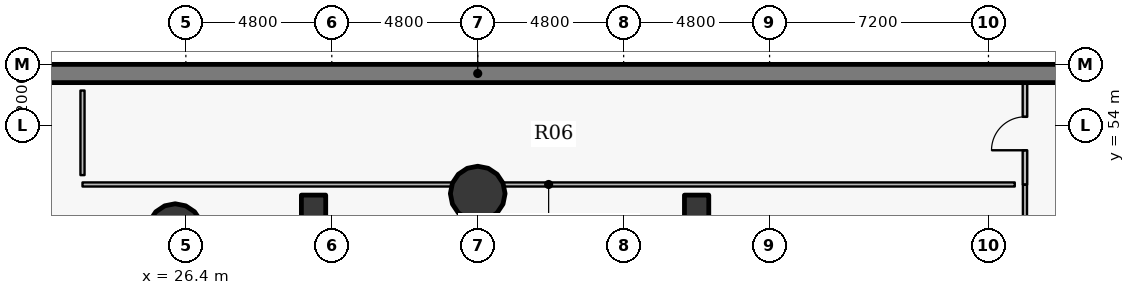
"""IFC4 building model, lengths in metres.
Left out: names, types, materials, properties, quantities, classifications, styles, units other than length and angle.
Written with IfcOpenShell. Run it as: python <this file> out.ifc"""

import sys

from ifc_helpers import new_model, si_unit, direction, frame, frame_2d, origin, origin_2d, place, context, subcontext, project, spatial, rectangle, hollow_circle, extrude, source, transform, mapped, element, fill, save


model = new_model("IFC4")
c1 = context("Model", 3, precision=1e-05, world=origin(), true_north=direction((0.0, 1.0)))
c2 = subcontext(c1, "Body", "Model", "MODEL_VIEW")
j1 = project(units=[si_unit("LENGTHUNIT", "METRE"), si_unit("PLANEANGLEUNIT", "RADIAN")], contexts=[c1])
p1 = place(None, origin())
s1 = spatial("IfcSite", under=j1, at=p1, CompositionType="ELEMENT")
p2 = place(p1, origin())
s2 = spatial("IfcBuilding", under=s1, at=p2, CompositionType="ELEMENT")
p3 = place(p2, frame((0.0, 0.0, -4.5)))
s3 = spatial("IfcBuildingStorey", under=s2, at=p3, CompositionType="ELEMENT", Elevation=-4.5)
p4 = place(p3, frame((30.6, 51.3, 0.0), z_axis=(0.0, 0.0, 1.0), x_axis=(1.0, 0.0, 0.0)))
e1 = element("IfcColumn", 1, at=p4, inside=s3, PredefinedType="COLUMN", context=c2, shape_type="SweptSolid", body=[
    extrude(rectangle(XDim=0.8, YDim=0.8, at=origin_2d()), origin(), (0.0, 0.0, 1.0), 1.525),
])
p5 = place(p3, frame((43.2, 51.3, 0.0), z_axis=(0.0, 0.0, 1.0), x_axis=(1.0, 0.0, 0.0)))
e2 = element("IfcColumn", 2, at=p5, inside=s3, PredefinedType="COLUMN", context=c2, shape_type="SweptSolid", body=[
    extrude(rectangle(XDim=0.8, YDim=0.8, at=origin_2d()), origin(), (0.0, 0.0, 1.0), 3.1),
])
p6 = place(p3, frame((-6.0, 55.7, 0.0), z_axis=(0.0, 0.0, 1.0), x_axis=(1.0, 0.0, 0.0)))
e3 = element("IfcWall", 3, at=p6, inside=s3, PredefinedType="SHEAR", context=c2, shape_type="SweptSolid", body=[
    extrude(rectangle(XDim=84.0, YDim=0.6, at=frame_2d((42.0, 0.0))), origin(), (0.0, 0.0, 1.0), 4.2),
])
for number, where, z_axis, x_axis in (
    (4, (36.0, 51.75, 0.0), (0.0, 0.0, 1.0), (1.0, 0.0, 0.0)),
    (5, (26.049, 50.516, 0.0), (0.0, 0.0, 1.0), (1.0, 0.0, 0.0)),
):
    element("IfcColumn", number, at=place(p3, frame(where, z_axis=z_axis, x_axis=x_axis)), inside=s3, PredefinedType="COLUMN", context=c2, shape_type="SweptSolid", body=[
        extrude(hollow_circle(Radius=0.9, WallThickness=0.05, at=origin_2d()), origin(), (0.0, 0.0, 1.0), 4.5),
    ])
p7 = place(p3, frame((54.0, 52.05, 0.0), z_axis=(0.0, 0.0, 1.0), x_axis=(0.0, 1.0, 0.0)))
e6 = element("IfcWall", 6, at=p7, inside=s3, PredefinedType="PARTITIONING", context=c2, shape_type="SweptSolid", body=[
    extrude(rectangle(XDim=3.35, YDim=0.15, at=frame_2d((1.675, 0.0))), origin(), (0.0, 0.0, 1.0), 3.385),
])
p8 = place(p7, frame((1.125, 0.0, 0.0)))
e7 = element("IfcOpeningElement", 7, at=p8, cuts=e6, PredefinedType="OPENING", context=c2, shape_type="SweptSolid", body=[
    extrude(rectangle(XDim=1.1, YDim=2.15, at=origin_2d()), frame((0.55, 0.085, 1.075), z_axis=(0.0, -1.0, 0.0), x_axis=(1.0, 0.0, 0.0)), (0.0, 0.0, 1.0), 0.17),
])
p9 = place(p3, frame((54.0, 45.528, 0.0), z_axis=(0.0, 0.0, 1.0), x_axis=(0.0, 1.0, 0.0)))
e8 = element("IfcWall", 8, at=p9, inside=s3, PredefinedType="PARTITIONING", context=c2, shape_type="SweptSolid", body=[
    extrude(rectangle(XDim=6.512, YDim=0.135, at=frame_2d((3.256, 0.0))), origin(), (0.0, 0.0, 1.0), 4.2),
])
p10 = place(p3, frame((53.665, 52.05, 0.0), z_axis=(0.0, 0.0, 1.0), x_axis=(-1.0, 0.0, 0.0)))
e9 = element("IfcWall", 9, at=p10, inside=s3, PredefinedType="PARTITIONING", context=c2, shape_type="SweptSolid", body=[
    extrude(rectangle(XDim=30.665, YDim=0.135, at=frame_2d((15.333, 0.0))), origin(), (0.0, 0.0, 1.0), 3.385),
])
p11 = place(p3, frame((23.0, 52.357, 0.0), z_axis=(0.0, 0.0, 1.0), x_axis=(0.0, 1.0, 0.0)))
e10 = element("IfcWall", 10, at=p11, inside=s3, PredefinedType="PARTITIONING", context=c2, shape_type="SweptSolid", body=[
    extrude(rectangle(XDim=2.782, YDim=0.135, at=frame_2d((1.391, 0.0))), origin(), (0.0, 0.0, 1.0), 4.2),
])
m1 = source(origin(), c2, "Body", "SweptSolid", [
    extrude(rectangle(XDim=1.1, YDim=2.15, at=origin_2d()), frame((0.55, 0.025, 1.075), z_axis=(0.0, -1.0, 0.0), x_axis=(1.0, 0.0, 0.0)), (0.0, 0.0, 1.0), 0.05),
])
p12 = place(p8, origin())
e11 = element("IfcDoor", 11, at=p12, inside=s3, OperationType="SINGLE_SWING_LEFT", PredefinedType="DOOR", context=c2, shape_type="MappedRepresentation", body=[
    mapped(m1, transform((0.0, 0.0, 0.0), x_axis=(1.0, 0.0, 0.0), y_axis=(0.0, 1.0, 0.0), z_axis=(0.0, 0.0, 1.0), scale=1.0)),
])
fill(e7, e11)
save(model, sys.argv[1])
